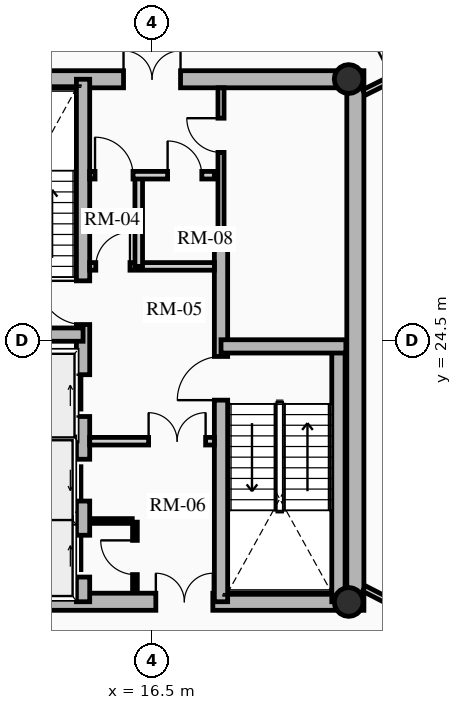
"""IFC4 building model, lengths in metres.
Left out: names, types, materials, properties, quantities, classifications, styles, units other than length and angle.
Written with IfcOpenShell. Run it as: python <this file> out.ifc"""

import sys

from ifc_helpers import new_model, si_unit, direction, frame, frame_2d, origin, origin_2d, place, context, subcontext, project, spatial, rectangle, hollow_circle, extrude, source, transform, mapped, element, fill, save


model = new_model("IFC4")
c1 = context("Model", 3, precision=1e-05, world=origin(), true_north=direction((0.0, 1.0)))
c2 = subcontext(c1, "Body", "Model", "MODEL_VIEW")
j1 = project(units=[si_unit("LENGTHUNIT", "METRE"), si_unit("PLANEANGLEUNIT", "RADIAN")], contexts=[c1])
p1 = place(None, origin())
s1 = spatial("IfcSite", under=j1, at=p1, CompositionType="ELEMENT")
p2 = place(p1, origin())
s2 = spatial("IfcBuilding", under=s1, at=p2, CompositionType="ELEMENT")
p3 = place(p2, frame((0.0, 0.0, 136.6)))
s3 = spatial("IfcBuildingStorey", under=s2, at=p3, CompositionType="ELEMENT", Elevation=136.6)
p4 = place(p3, frame((21.85, 17.4, 0.0), z_axis=(0.0, 0.0, 1.0), x_axis=(0.0, 1.0, 0.0)))
e1 = element("IfcWall", 1, at=p4, inside=s3, PredefinedType="SHEAR", context=c2, shape_type="SweptSolid", body=[
    extrude(rectangle(XDim=14.2, YDim=0.45, at=frame_2d((7.1, 0.0))), origin(), (0.0, 0.0, 1.0), 3.72),
])
p5 = place(p3, frame((11.15, 17.625, 0.0), z_axis=(0.0, 0.0, 1.0), x_axis=(1.0, 0.0, 0.0)))
e2 = element("IfcWall", 2, at=p5, inside=s3, PredefinedType="SHEAR", context=c2, shape_type="SweptSolid", body=[
    extrude(rectangle(XDim=10.7, YDim=0.45, at=frame_2d((5.35, 0.0))), origin(), (0.0, 0.0, 1.0), 3.72),
])
m1 = source(origin(), c2, "Body", "SweptSolid", [
    extrude(rectangle(XDim=1.5, YDim=2.02, at=frame_2d((0.75, 1.01))), frame((0.0, 0.235, 0.0), z_axis=(0.0, -1.0, 0.0), x_axis=(1.0, 0.0, 0.0)), (0.0, 0.0, 1.0), 0.47),
])
p6 = place(p5, frame((5.45, 0.0, 0.0)))
e3 = element("IfcOpeningElement", 3, at=p6, cuts=e2, PredefinedType="OPENING", context=c2, shape_type="MappedRepresentation", body=[
    mapped(m1, transform((0.0, 0.0, 0.0), x_axis=(1.0, 0.0, 0.0), y_axis=(0.0, 1.0, 0.0), z_axis=(0.0, 0.0, 1.0), scale=1.0)),
])
p7 = place(p3, frame((11.15, 31.375, 0.0), z_axis=(0.0, 0.0, 1.0), x_axis=(1.0, 0.0, 0.0)))
e4 = element("IfcWall", 4, at=p7, inside=s3, PredefinedType="SHEAR", context=c2, shape_type="SweptSolid", body=[
    extrude(rectangle(XDim=10.7, YDim=0.45, at=frame_2d((5.35, 0.0))), origin(), (0.0, 0.0, 1.0), 3.72),
])
p8 = place(p7, frame((4.6, 0.0, 0.0)))
e5 = element("IfcOpeningElement", 5, at=p8, cuts=e4, PredefinedType="OPENING", context=c2, shape_type="MappedRepresentation", body=[
    mapped(m1, transform((0.0, 0.0, 0.0), x_axis=(1.0, 0.0, 0.0), y_axis=(0.0, 1.0, 0.0), z_axis=(0.0, 0.0, 1.0), scale=1.0)),
])
p9 = place(p3, frame((14.685, 17.625, 0.0), z_axis=(0.0, 0.0, 1.0), x_axis=(0.0, 1.0, 0.0)))
e6 = element("IfcWall", 6, at=p9, inside=s3, PredefinedType="SHEAR", context=c2, shape_type="SweptSolid", body=[
    extrude(rectangle(XDim=13.75, YDim=0.35, at=frame_2d((6.875, 0.0))), origin(), (0.0, 0.0, 1.0), 3.72),
])
m2 = source(origin(), c2, "Body", "SweptSolid", [
    extrude(rectangle(XDim=1.1, YDim=2.015, at=frame_2d((0.55, 1.007))), frame((0.0, 0.185, 0.0), z_axis=(0.0, -1.0, 0.0), x_axis=(1.0, 0.0, 0.0)), (0.0, 0.0, 1.0), 0.37),
])
p10 = place(p9, frame((4.875, 0.0, 0.0)))
e7 = element("IfcOpeningElement", 7, at=p10, cuts=e6, PredefinedType="OPENING", context=c2, shape_type="MappedRepresentation", body=[
    mapped(m2, transform((0.0, 0.0, 0.0), x_axis=(1.0, 0.0, 0.0), y_axis=(0.0, 1.0, 0.0), z_axis=(0.0, 0.0, 1.0), scale=1.0)),
])
p11 = place(p9, frame((0.65, 0.0, 0.0)))
e8 = element("IfcOpeningElement", 8, at=p11, cuts=e6, PredefinedType="OPENING", context=c2, shape_type="MappedRepresentation", body=[
    mapped(m2, transform((0.0, 0.0, 0.0), x_axis=(1.0, 0.0, 0.0), y_axis=(0.0, 1.0, 0.0), z_axis=(0.0, 0.0, 1.0), scale=1.0)),
])
p12 = place(p9, frame((2.65, 0.0, 0.0)))
e9 = element("IfcOpeningElement", 9, at=p12, cuts=e6, PredefinedType="OPENING", context=c2, shape_type="MappedRepresentation", body=[
    mapped(m2, transform((0.0, 0.0, 0.0), x_axis=(1.0, 0.0, 0.0), y_axis=(0.0, 1.0, 0.0), z_axis=(0.0, 0.0, 1.0), scale=1.0)),
])
m3 = source(origin(), c2, "Body", "SweptSolid", [
    extrude(rectangle(XDim=1.15, YDim=2.02, at=frame_2d((0.575, 1.01))), frame((0.0, 0.185, 0.0), z_axis=(0.0, -1.0, 0.0), x_axis=(1.0, 0.0, 0.0)), (0.0, 0.0, 1.0), 0.37),
])
p13 = place(p9, frame((7.295, 0.0, 0.0)))
e10 = element("IfcOpeningElement", 10, at=p13, cuts=e6, PredefinedType="OPENING", context=c2, shape_type="MappedRepresentation", body=[
    mapped(m3, transform((0.0, 0.0, 0.0), x_axis=(1.0, 0.0, 0.0), y_axis=(0.0, 1.0, 0.0), z_axis=(0.0, 0.0, 1.0), scale=1.0)),
])
p14 = place(p3, frame((18.315, 17.625, 0.0), z_axis=(0.0, 0.0, 1.0), x_axis=(0.0, 1.0, 0.0)))
e11 = element("IfcWall", 11, at=p14, inside=s3, PredefinedType="SHEAR", context=c2, shape_type="SweptSolid", body=[
    extrude(rectangle(XDim=9.625, YDim=0.35, at=frame_2d((4.812, 0.0))), origin(), (0.0, 0.0, 1.0), 3.72),
])
p15 = place(p14, frame((5.305, 0.0, 0.0)))
e12 = element("IfcOpeningElement", 12, at=p15, cuts=e11, PredefinedType="OPENING", context=c2, shape_type="MappedRepresentation", body=[
    mapped(m3, transform((0.0, 0.0, 0.0), x_axis=(1.0, 0.0, 0.0), y_axis=(0.0, 1.0, 0.0), z_axis=(0.0, 0.0, 1.0), scale=1.0)),
])
p16 = place(p3, frame((11.4, 24.655, 0.0), z_axis=(0.0, 0.0, 1.0), x_axis=(1.0, 0.0, 0.0)))
e13 = element("IfcWall", 13, at=p16, inside=s3, PredefinedType="SHEAR", context=c2, shape_type="SweptSolid", body=[
    extrude(rectangle(XDim=3.285, YDim=0.35, at=frame_2d((1.643, 0.0))), origin(), (0.0, 0.0, 1.0), 3.72),
])
p17 = place(p3, frame((21.405, 17.625, 0.0), z_axis=(0.0, 0.0, 1.0), x_axis=(0.0, 1.0, 0.0)))
e14 = element("IfcWall", 14, at=p17, inside=s3, PredefinedType="SHEAR", context=c2, shape_type="SweptSolid", body=[
    extrude(rectangle(XDim=6.72, YDim=0.35, at=frame_2d((3.36, 0.0))), origin(), (0.0, 0.0, 1.0), 3.72),
])
p18 = place(p3, frame((18.315, 24.345, 0.0), z_axis=(0.0, 0.0, 1.0), x_axis=(1.0, 0.0, 0.0)))
e15 = element("IfcWall", 15, at=p18, inside=s3, PredefinedType="SHEAR", context=c2, shape_type="SweptSolid", body=[
    extrude(rectangle(XDim=3.285, YDim=0.35, at=frame_2d((1.643, 0.0))), origin(), (0.0, 0.0, 1.0), 3.72),
])
for number, where, z_axis, x_axis in (
    (16, (21.675, 17.62, 0.0), (0.0, 0.0, 1.0), (1.0, 0.0, 0.0)),
    (17, (21.675, 31.38, 0.0), (0.0, 0.0, 1.0), (1.0, 0.0, 0.0)),
):
    element("IfcColumn", number, at=place(p3, frame(where, z_axis=z_axis, x_axis=x_axis)), inside=s3, PredefinedType="COLUMN", context=c2, shape_type="SweptSolid", body=[
        extrude(hollow_circle(Radius=0.38, WallThickness=0.032, at=origin_2d()), origin(), (0.0, 0.0, 1.0), 3.72),
    ])
for number, where, z_axis, x_axis in (
    (18, (11.52, 21.8, 0.0), (0.0, 0.0, 1.0), (1.0, 0.0, 0.0)),
    (19, (11.52, 19.825, 0.0), (0.0, 0.0, 1.0), (1.0, 0.0, 0.0)),
):
    element("IfcWall", number, at=place(p3, frame(where, z_axis=z_axis, x_axis=x_axis)), inside=s3, PredefinedType="SHEAR", context=c2, shape_type="SweptSolid", body=[
        extrude(rectangle(XDim=2.97, YDim=0.2, at=frame_2d((1.485, 0.0))), origin(), (0.0, 0.0, 1.0), 3.72),
    ])
p19 = place(p3, frame((14.86, 21.85, 0.0), z_axis=(0.0, 0.0, 1.0), x_axis=(1.0, 0.0, 0.0)))
e20 = element("IfcWall", 20, at=p19, inside=s3, PredefinedType="PARTITIONING", context=c2, shape_type="SweptSolid", body=[
    extrude(rectangle(XDim=3.28, YDim=0.2, at=frame_2d((1.64, 0.0))), origin(), (0.0, 0.0, 1.0), 3.425),
])
m4 = source(origin(), c2, "Body", "SweptSolid", [
    extrude(rectangle(XDim=1.5, YDim=2.02, at=frame_2d((0.75, 1.01))), frame((0.0, 0.11, 0.0), z_axis=(0.0, -1.0, 0.0), x_axis=(1.0, 0.0, 0.0)), (0.0, 0.0, 1.0), 0.22),
])
p20 = place(p19, frame((1.55, 0.0, 0.0)))
e21 = element("IfcOpeningElement", 21, at=p20, cuts=e20, PredefinedType="OPENING", context=c2, shape_type="MappedRepresentation", body=[
    mapped(m4, transform((0.0, 0.0, 0.0), x_axis=(1.0, 0.0, 0.0), y_axis=(0.0, 1.0, 0.0), z_axis=(0.0, 0.0, 1.0), scale=1.0)),
])
p21 = place(p3, frame((14.86, 26.45, 0.0), z_axis=(0.0, 0.0, 1.0), x_axis=(1.0, 0.0, 0.0)))
e22 = element("IfcWall", 22, at=p21, inside=s3, PredefinedType="PARTITIONING", context=c2, shape_type="SweptSolid", body=[
    extrude(rectangle(XDim=3.28, YDim=0.2, at=frame_2d((1.64, 0.0))), origin(), (0.0, 0.0, 1.0), 3.425),
])
m5 = source(origin(), c2, "Body", "SweptSolid", [
    extrude(rectangle(XDim=0.9, YDim=2.005, at=frame_2d((0.45, 1.002))), frame((0.0, 0.11, 0.0), z_axis=(0.0, -1.0, 0.0), x_axis=(1.0, 0.0, 0.0)), (0.0, 0.0, 1.0), 0.22),
])
p22 = place(p21, frame((0.16, 0.0, 0.0)))
e23 = element("IfcOpeningElement", 23, at=p22, cuts=e22, PredefinedType="OPENING", context=c2, shape_type="MappedRepresentation", body=[
    mapped(m5, transform((0.0, 0.0, 0.0), x_axis=(1.0, 0.0, 0.0), y_axis=(0.0, 1.0, 0.0), z_axis=(0.0, 0.0, 1.0), scale=1.0)),
])
p23 = place(p3, frame((16.15, 26.45, 0.0), z_axis=(0.0, 0.0, 1.0), x_axis=(0.0, 1.0, 0.0)))
e24 = element("IfcWall", 24, at=p23, inside=s3, PredefinedType="PARTITIONING", context=c2, shape_type="SweptSolid", body=[
    extrude(rectangle(XDim=2.4, YDim=0.2, at=frame_2d((1.2, 0.0))), origin(), (0.0, 0.0, 1.0), 3.425),
])
p24 = place(p3, frame((14.86, 28.85, 0.0), z_axis=(0.0, 0.0, 1.0), x_axis=(1.0, 0.0, 0.0)))
e25 = element("IfcWall", 25, at=p24, inside=s3, PredefinedType="PARTITIONING", context=c2, shape_type="SweptSolid", body=[
    extrude(rectangle(XDim=3.28, YDim=0.2, at=frame_2d((1.64, 0.0))), origin(), (0.0, 0.0, 1.0), 3.425),
])
m6 = source(origin(), c2, "Body", "SweptSolid", [
    extrude(rectangle(XDim=1.0, YDim=2.015, at=frame_2d((0.5, 1.007))), frame((0.0, 0.11, 0.0), z_axis=(0.0, -1.0, 0.0), x_axis=(1.0, 0.0, 0.0)), (0.0, 0.0, 1.0), 0.22),
])
p25 = place(p24, frame((0.14, 0.0, 0.0)))
e26 = element("IfcOpeningElement", 26, at=p25, cuts=e25, PredefinedType="OPENING", context=c2, shape_type="MappedRepresentation", body=[
    mapped(m6, transform((0.0, 0.0, 0.0), x_axis=(1.0, 0.0, 0.0), y_axis=(0.0, 1.0, 0.0), z_axis=(0.0, 0.0, 1.0), scale=1.0)),
])
p26 = place(p24, frame((2.05, 0.0, 0.0)))
e27 = element("IfcOpeningElement", 27, at=p26, cuts=e25, PredefinedType="OPENING", context=c2, shape_type="MappedRepresentation", body=[
    mapped(m5, transform((0.0, 0.0, 0.0), x_axis=(1.0, 0.0, 0.0), y_axis=(0.0, 1.0, 0.0), z_axis=(0.0, 0.0, 1.0), scale=1.0)),
])
p27 = place(p3, frame((16.05, 17.92, 0.0), z_axis=(0.0, 0.0, 1.0), x_axis=(0.0, 1.0, 0.0)))
e28 = element("IfcWall", 28, at=p27, inside=s3, PredefinedType="PARTITIONING", context=c2, shape_type="SweptSolid", body=[
    extrude(rectangle(XDim=1.8, YDim=0.125, at=frame_2d((0.9, 0.0))), origin(), (0.0, 0.0, 1.0), 3.425),
])
m7 = source(origin(), c2, "Body", "SweptSolid", [
    extrude(rectangle(XDim=0.9, YDim=2.005, at=frame_2d((0.45, 1.002))), frame((0.0, 0.073, 0.0), z_axis=(0.0, -1.0, 0.0), x_axis=(1.0, 0.0, 0.0)), (0.0, 0.0, 1.0), 0.145),
])
p28 = place(p27, frame((0.42, 0.0, 0.0)))
e29 = element("IfcOpeningElement", 29, at=p28, cuts=e28, PredefinedType="OPENING", context=c2, shape_type="MappedRepresentation", body=[
    mapped(m7, transform((0.0, 0.0, 0.0), x_axis=(1.0, 0.0, 0.0), y_axis=(0.0, 1.0, 0.0), z_axis=(0.0, 0.0, 1.0), scale=1.0)),
])
p29 = place(p3, frame((14.88, 19.75, 0.0), z_axis=(0.0, 0.0, 1.0), x_axis=(1.0, 0.0, 0.0)))
e30 = element("IfcWall", 30, at=p29, inside=s3, PredefinedType="PARTITIONING", context=c2, shape_type="SweptSolid", body=[
    extrude(rectangle(XDim=1.1, YDim=0.125, at=frame_2d((0.55, 0.0))), origin(), (0.0, 0.0, 1.0), 3.425),
])
p30 = place(p3, frame((18.315, 27.25, 0.0), z_axis=(0.0, 0.0, 1.0), x_axis=(0.0, 1.0, 0.0)))
e31 = element("IfcWall", 31, at=p30, inside=s3, PredefinedType="PARTITIONING", context=c2, shape_type="SweptSolid", body=[
    extrude(rectangle(XDim=3.9, YDim=0.16, at=frame_2d((1.95, 0.0))), origin(), (0.0, 0.0, 1.0), 3.425),
])
m8 = source(origin(), c2, "Body", "SweptSolid", [
    extrude(rectangle(XDim=0.9, YDim=2.005, at=frame_2d((0.45, 1.002))), frame((0.0, 0.09, 0.0), z_axis=(0.0, -1.0, 0.0), x_axis=(1.0, 0.0, 0.0)), (0.0, 0.0, 1.0), 0.18),
])
p31 = place(p30, frame((2.2, 0.0, 0.0)))
e32 = element("IfcOpeningElement", 32, at=p31, cuts=e31, PredefinedType="OPENING", context=c2, shape_type="MappedRepresentation", body=[
    mapped(m8, transform((0.0, 0.0, 0.0), x_axis=(1.0, 0.0, 0.0), y_axis=(0.0, 1.0, 0.0), z_axis=(0.0, 0.0, 1.0), scale=1.0)),
])
p32 = place(p3, frame((22.075, 31.025, 0.0), z_axis=(0.0, 0.0, 1.0), x_axis=(0.8959286695, 0.444197950432, 0.0)))
e33 = element("IfcWall", 33, at=p32, inside=s3, PredefinedType="PARTITIONING", context=c2, shape_type="SweptSolid", body=[
    extrude(rectangle(XDim=2.074, YDim=0.16, at=frame_2d((1.037, 0.0))), origin(), (0.0, 0.0, 1.0), 2.995),
])
m9 = source(origin(), c2, "Body", "SweptSolid", [
    extrude(rectangle(XDim=1.05, YDim=2.015, at=frame_2d((0.525, 1.007))), frame((0.0, 0.09, 0.0), z_axis=(0.0, -1.0, 0.0), x_axis=(1.0, 0.0, 0.0)), (0.0, 0.0, 1.0), 0.18),
])
p33 = place(p32, frame((0.824, 0.0, 0.0)))
e34 = element("IfcOpeningElement", 34, at=p33, cuts=e33, PredefinedType="OPENING", context=c2, shape_type="MappedRepresentation", body=[
    mapped(m9, transform((0.0, 0.0, 0.0), x_axis=(1.0, 0.0, 0.0), y_axis=(0.0, 1.0, 0.0), z_axis=(0.0, 0.0, 1.0), scale=1.0)),
])
p34 = place(p3, frame((22.075, 17.975, 0.0), z_axis=(0.0, 0.0, 1.0), x_axis=(0.889835034782, -0.456282380632, 0.0)))
e35 = element("IfcWall", 35, at=p34, inside=s3, PredefinedType="PARTITIONING", context=c2, shape_type="SweptSolid", body=[
    extrude(rectangle(XDim=2.17, YDim=0.16, at=frame_2d((1.085, 0.0))), origin(), (0.0, 0.0, 1.0), 2.995),
])
p35 = place(p34, frame((0.92, 0.0, 0.0)))
e36 = element("IfcOpeningElement", 36, at=p35, cuts=e35, PredefinedType="OPENING", context=c2, shape_type="MappedRepresentation", body=[
    mapped(m9, transform((0.0, 0.0, 0.0), x_axis=(1.0, 0.0, 0.0), y_axis=(0.0, 1.0, 0.0), z_axis=(0.0, 0.0, 1.0), scale=1.0)),
])
m10 = source(origin(), c2, "Body", "SweptSolid", [
    extrude(rectangle(XDim=1.1, YDim=2.015, at=frame_2d((0.55, 1.007))), frame((0.0, 0.025, 0.0), z_axis=(0.0, -1.0, 0.0), x_axis=(1.0, 0.0, 0.0)), (0.0, 0.0, 1.0), 0.05),
])
p36 = place(p10, origin())
e37 = element("IfcDoor", 37, at=p36, inside=s3, OperationType="SLIDING_TO_RIGHT", PredefinedType="DOOR", context=c2, shape_type="MappedRepresentation", body=[
    mapped(m10, transform((0.0, 0.0, 0.0), x_axis=(1.0, 0.0, 0.0), y_axis=(0.0, 1.0, 0.0), z_axis=(0.0, 0.0, 1.0), scale=1.0)),
])
fill(e7, e37)
p37 = place(p11, origin())
e38 = element("IfcDoor", 38, at=p37, inside=s3, OperationType="SLIDING_TO_RIGHT", PredefinedType="DOOR", context=c2, shape_type="MappedRepresentation", body=[
    mapped(m10, transform((0.0, 0.0, 0.0), x_axis=(1.0, 0.0, 0.0), y_axis=(0.0, 1.0, 0.0), z_axis=(0.0, 0.0, 1.0), scale=1.0)),
])
fill(e8, e38)
p38 = place(p12, origin())
e39 = element("IfcDoor", 39, at=p38, inside=s3, OperationType="SLIDING_TO_LEFT", PredefinedType="DOOR", context=c2, shape_type="MappedRepresentation", body=[
    mapped(m10, transform((0.0, 0.0, 0.0), x_axis=(1.0, 0.0, 0.0), y_axis=(0.0, 1.0, 0.0), z_axis=(0.0, 0.0, 1.0), scale=1.0)),
])
fill(e9, e39)
m11 = source(origin(), c2, "Body", "SweptSolid", [
    extrude(rectangle(XDim=1.15, YDim=2.02, at=frame_2d((0.575, 1.01))), frame((0.0, 0.025, 0.0), z_axis=(0.0, -1.0, 0.0), x_axis=(1.0, 0.0, 0.0)), (0.0, 0.0, 1.0), 0.05),
])
p39 = place(p13, origin())
e40 = element("IfcDoor", 40, at=p39, inside=s3, OperationType="SINGLE_SWING_RIGHT", PredefinedType="DOOR", context=c2, shape_type="MappedRepresentation", body=[
    mapped(m11, transform((0.0, 0.0, 0.0), x_axis=(1.0, 0.0, 0.0), y_axis=(0.0, 1.0, 0.0), z_axis=(0.0, 0.0, 1.0), scale=1.0)),
])
fill(e10, e40)
p40 = place(p15, origin())
e41 = element("IfcDoor", 41, at=p40, inside=s3, OperationType="SINGLE_SWING_LEFT", PredefinedType="DOOR", context=c2, shape_type="MappedRepresentation", body=[
    mapped(m11, transform((0.0, 0.0, 0.0), x_axis=(1.0, 0.0, 0.0), y_axis=(0.0, 1.0, 0.0), z_axis=(0.0, 0.0, 1.0), scale=1.0)),
])
fill(e12, e41)
m12 = source(origin(), c2, "Body", "SweptSolid", [
    extrude(rectangle(XDim=1.5, YDim=2.02, at=frame_2d((0.75, 1.01))), frame((0.0, 0.025, 0.0), z_axis=(0.0, -1.0, 0.0), x_axis=(1.0, 0.0, 0.0)), (0.0, 0.0, 1.0), 0.05),
])
p41 = place(p8, origin())
e42 = element("IfcDoor", 42, at=p41, inside=s3, OperationType="DOUBLE_DOOR_SINGLE_SWING", PredefinedType="DOOR", context=c2, shape_type="MappedRepresentation", body=[
    mapped(m12, transform((0.0, 0.0, 0.0), x_axis=(1.0, 0.0, 0.0), y_axis=(0.0, 1.0, 0.0), z_axis=(0.0, 0.0, 1.0), scale=1.0)),
])
fill(e5, e42)
p42 = place(p6, origin())
e43 = element("IfcDoor", 43, at=p42, inside=s3, OperationType="DOUBLE_DOOR_SINGLE_SWING", PredefinedType="DOOR", context=c2, shape_type="MappedRepresentation", body=[
    mapped(m12, transform((0.0, 0.0, 0.0), x_axis=(1.0, 0.0, 0.0), y_axis=(0.0, 1.0, 0.0), z_axis=(0.0, 0.0, 1.0), scale=1.0)),
])
fill(e3, e43)
p43 = place(p20, origin())
e44 = element("IfcDoor", 44, at=p43, inside=s3, OperationType="DOUBLE_DOOR_SINGLE_SWING", PredefinedType="DOOR", context=c2, shape_type="MappedRepresentation", body=[
    mapped(m12, transform((0.0, 0.0, 0.0), x_axis=(1.0, 0.0, 0.0), y_axis=(0.0, 1.0, 0.0), z_axis=(0.0, 0.0, 1.0), scale=1.0)),
])
fill(e21, e44)
m13 = source(origin(), c2, "Body", "SweptSolid", [
    extrude(rectangle(XDim=0.9, YDim=2.005, at=frame_2d((0.45, 1.002))), frame((0.0, 0.025, 0.0), z_axis=(0.0, -1.0, 0.0), x_axis=(1.0, 0.0, 0.0)), (0.0, 0.0, 1.0), 0.05),
])
p44 = place(p22, origin())
e45 = element("IfcDoor", 45, at=p44, inside=s3, OperationType="SINGLE_SWING_RIGHT", PredefinedType="DOOR", context=c2, shape_type="MappedRepresentation", body=[
    mapped(m13, transform((0.0, 0.0, 0.0), x_axis=(1.0, 0.0, 0.0), y_axis=(0.0, 1.0, 0.0), z_axis=(0.0, 0.0, 1.0), scale=1.0)),
])
fill(e23, e45)
m14 = source(origin(), c2, "Body", "SweptSolid", [
    extrude(rectangle(XDim=1.0, YDim=2.015, at=frame_2d((0.5, 1.007))), frame((0.0, 0.025, 0.0), z_axis=(0.0, -1.0, 0.0), x_axis=(1.0, 0.0, 0.0)), (0.0, 0.0, 1.0), 0.05),
])
p45 = place(p25, origin())
e46 = element("IfcDoor", 46, at=p45, inside=s3, OperationType="SINGLE_SWING_LEFT", PredefinedType="DOOR", context=c2, shape_type="MappedRepresentation", body=[
    mapped(m14, transform((0.0, 0.0, 0.0), x_axis=(1.0, 0.0, 0.0), y_axis=(0.0, 1.0, 0.0), z_axis=(0.0, 0.0, 1.0), scale=1.0)),
])
fill(e26, e46)
p46 = place(p28, origin())
e47 = element("IfcDoor", 47, at=p46, inside=s3, OperationType="SINGLE_SWING_RIGHT", PredefinedType="DOOR", context=c2, shape_type="MappedRepresentation", body=[
    mapped(m13, transform((0.0, 0.0, 0.0), x_axis=(1.0, 0.0, 0.0), y_axis=(0.0, 1.0, 0.0), z_axis=(0.0, 0.0, 1.0), scale=1.0)),
])
fill(e29, e47)
p47 = place(p26, origin())
e48 = element("IfcDoor", 48, at=p47, inside=s3, OperationType="SINGLE_SWING_LEFT", PredefinedType="DOOR", context=c2, shape_type="MappedRepresentation", body=[
    mapped(m13, transform((0.0, 0.0, 0.0), x_axis=(1.0, 0.0, 0.0), y_axis=(0.0, 1.0, 0.0), z_axis=(0.0, 0.0, 1.0), scale=1.0)),
])
fill(e27, e48)
p48 = place(p31, origin())
e49 = element("IfcDoor", 49, at=p48, inside=s3, OperationType="SINGLE_SWING_RIGHT", PredefinedType="DOOR", context=c2, shape_type="MappedRepresentation", body=[
    mapped(m13, transform((0.0, 0.0, 0.0), x_axis=(1.0, 0.0, 0.0), y_axis=(0.0, 1.0, 0.0), z_axis=(0.0, 0.0, 1.0), scale=1.0)),
])
fill(e32, e49)
save(model, sys.argv[1])
